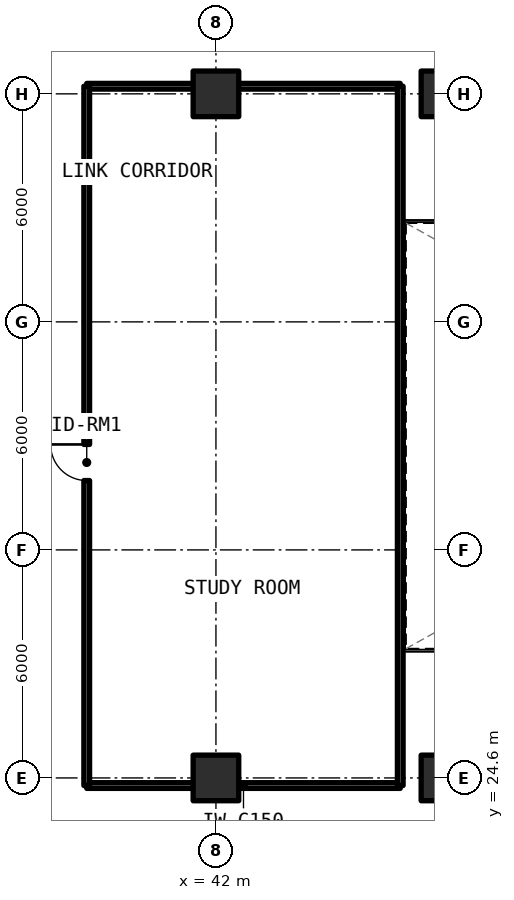
"""IFC4 building model, lengths in metres.
Left out: names, types, materials, properties, quantities, classifications, styles, units other than length and angle.
Written with IfcOpenShell. Run it as: python <this file> out.ifc"""

import sys

from ifc_helpers import new_model, si_unit, direction, frame, frame_2d, origin, origin_2d, place, context, subcontext, project, spatial, rectangle, extrude, element, fill, save


model = new_model("IFC4")
c1 = context("Model", 3, precision=1e-05, world=origin(), true_north=direction((0.0, 1.0)))
c2 = subcontext(c1, "Body", "Model", "MODEL_VIEW")
j1 = project(units=[si_unit("LENGTHUNIT", "METRE"), si_unit("PLANEANGLEUNIT", "RADIAN")], contexts=[c1])
p1 = place(None, origin())
s1 = spatial("IfcSite", under=j1, at=p1, CompositionType="ELEMENT")
p2 = place(p1, origin())
s2 = spatial("IfcBuilding", under=s1, at=p2, CompositionType="ELEMENT")
p3 = place(p2, frame((0.0, 0.0, 45.54)))
s3 = spatial("IfcBuildingStorey", under=s2, at=p3, CompositionType="ELEMENT", Elevation=45.54)
for number, where, z_axis, x_axis in (
    (1, (42.0, 24.6, 0.0), (0.0, 0.0, 1.0), (1.0, 0.0, 0.0)),
    (2, (42.0, 42.6, 0.0), (0.0, 0.0, 1.0), (1.0, 0.0, 0.0)),
    (3, (48.0, 24.6, 0.0), (0.0, 0.0, 1.0), (1.0, 0.0, 0.0)),
    (4, (48.0, 42.6, 0.0), (0.0, 0.0, 1.0), (1.0, 0.0, 0.0)),
):
    element("IfcColumn", number, at=place(p3, frame(where, z_axis=z_axis, x_axis=x_axis)), inside=s3, PredefinedType="COLUMN", context=c2, shape_type="SweptSolid", body=[
        extrude(rectangle(XDim=1.2, YDim=1.2, at=origin_2d()), origin(), (0.0, 0.0, 1.0), 3.3),
    ])
for number, where, z_axis, x_axis in (
    (5, (38.6, 24.4, 0.0), (0.0, 0.0, 1.0), (1.0, 0.0, 0.0)),
    (6, (38.6, 42.8, 0.0), (0.0, 0.0, 1.0), (1.0, 0.0, 0.0)),
):
    element("IfcWall", number, at=place(p3, frame(where, z_axis=z_axis, x_axis=x_axis)), inside=s3, PredefinedType="SOLIDWALL", context=c2, shape_type="SweptSolid", body=[
        extrude(rectangle(XDim=8.25, YDim=0.15, at=frame_2d((4.125, 0.0))), origin(), (0.0, 0.0, 1.0), 2.295),
    ])
p4 = place(p3, frame((38.6, 24.4, 0.0), z_axis=(0.0, 0.0, 1.0), x_axis=(0.0, 1.0, 0.0)))
e7 = element("IfcWall", 7, at=p4, inside=s3, PredefinedType="SOLIDWALL", context=c2, shape_type="SweptSolid", body=[
    extrude(rectangle(XDim=18.4, YDim=0.15, at=frame_2d((9.2, 0.0))), origin(), (0.0, 0.0, 1.0), 2.35),
])
p5 = place(p4, frame((8.025, 0.0, 0.0)))
e8 = element("IfcOpeningElement", 8, at=p5, cuts=e7, PredefinedType="OPENING", context=c2, shape_type="SweptSolid", body=[
    extrude(rectangle(XDim=0.95, YDim=2.15, at=frame_2d((0.475, 1.075))), frame((0.0, 0.085, 0.0), z_axis=(0.0, -1.0, 0.0), x_axis=(1.0, 0.0, 0.0)), (0.0, 0.0, 1.0), 0.17),
])
p6 = place(p3, frame((46.85, 24.4, 0.0), z_axis=(0.0, 0.0, 1.0), x_axis=(0.0, 1.0, 0.0)))
e9 = element("IfcWall", 9, at=p6, inside=s3, PredefinedType="SOLIDWALL", context=c2, shape_type="SweptSolid", body=[
    extrude(rectangle(XDim=18.4, YDim=0.15, at=frame_2d((9.2, 0.0))), origin(), (0.0, 0.0, 1.0), 2.35),
])
p7 = place(p5, origin())
e10 = element("IfcDoor", 10, at=p7, inside=s3, OperationType="SINGLE_SWING_RIGHT", PredefinedType="DOOR", context=c2, shape_type="SweptSolid", body=[
    extrude(rectangle(XDim=0.95, YDim=2.15, at=frame_2d((0.475, 1.075))), frame((0.0, 0.025, 0.0), z_axis=(0.0, -1.0, 0.0), x_axis=(1.0, 0.0, 0.0)), (0.0, 0.0, 1.0), 0.05),
])
fill(e8, e10)
save(model, sys.argv[1])
